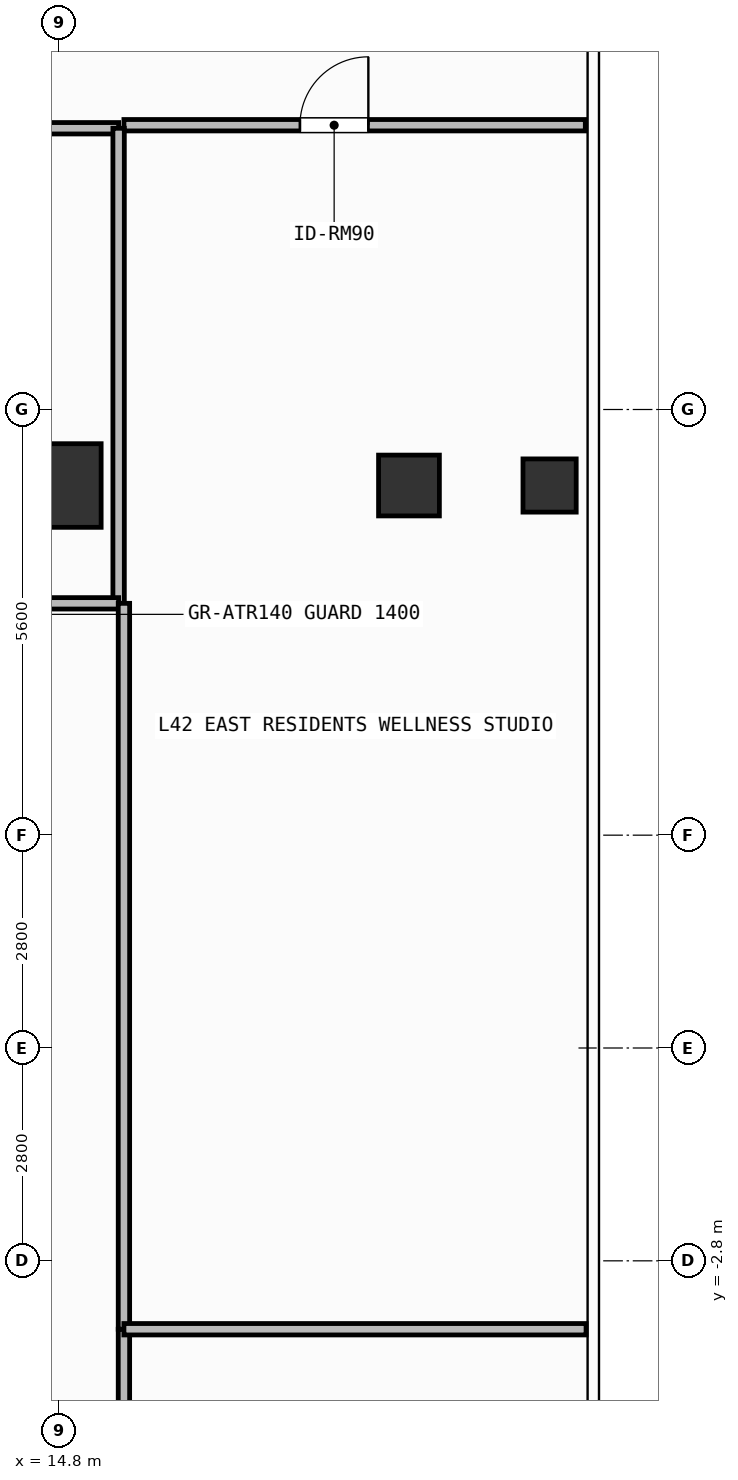
"""IFC4 building model, lengths in metres.
Left out: names, types, materials, properties, quantities, classifications, styles, units other than length and angle.
Written with IfcOpenShell. Run it as: python <this file> out.ifc"""

import sys

from ifc_helpers import new_model, si_unit, direction, frame, frame_2d, origin, origin_2d, place, context, subcontext, project, spatial, rectangle, hollow_rectangle, extrude, element, fill, save


model = new_model("IFC4")
c1 = context("Model", 3, precision=1e-05, world=origin(), true_north=direction((0.0, 1.0)))
c2 = subcontext(c1, "Body", "Model", "MODEL_VIEW")
j1 = project(units=[si_unit("LENGTHUNIT", "METRE"), si_unit("PLANEANGLEUNIT", "RADIAN")], contexts=[c1])
p1 = place(None, origin())
s1 = spatial("IfcSite", under=j1, at=p1, CompositionType="ELEMENT")
p2 = place(p1, origin())
s2 = spatial("IfcBuilding", under=s1, at=p2, CompositionType="ELEMENT")
p3 = place(p2, frame((0.0, 0.0, 171.9)))
s3 = spatial("IfcBuildingStorey", under=s2, at=p3, CompositionType="ELEMENT", Elevation=171.9)
p4 = place(p3, frame((14.8, 7.4, 0.0), z_axis=(0.0, 0.0, 1.0), x_axis=(1.0, 0.0, 0.0)))
e1 = element("IfcColumn", 1, at=p4, inside=s3, PredefinedType="COLUMN", context=c2, shape_type="SweptSolid", body=[
    extrude(rectangle(XDim=1.1, YDim=1.1, at=origin_2d()), origin(), (0.0, 0.0, 1.0), 3.9),
])
p5 = place(p3, frame((19.4, 7.4, 0.0), z_axis=(0.0, 0.0, 1.0), x_axis=(1.0, 0.0, 0.0)))
e2 = element("IfcColumn", 2, at=p5, inside=s3, PredefinedType="COLUMN", context=c2, shape_type="SweptSolid", body=[
    extrude(hollow_rectangle(XDim=0.8, YDim=0.8, WallThickness=0.036, at=origin_2d()), origin(), (0.0, 0.0, 1.0), 3.9),
])
p6 = place(p3, frame((21.25, 7.4, 0.0), z_axis=(0.0, 0.0, 1.0), x_axis=(1.0, 0.0, 0.0)))
e3 = element("IfcColumn", 3, at=p6, inside=s3, PredefinedType="COLUMN", context=c2, shape_type="SweptSolid", body=[
    extrude(hollow_rectangle(XDim=0.7, YDim=0.7, WallThickness=0.032, at=origin_2d()), origin(), (0.0, 0.0, 1.0), 3.9),
])
p7 = place(p3, frame((8.36, 12.1, 0.0), z_axis=(0.0, 0.0, 1.0), x_axis=(1.0, 0.0, 0.0)))
e4 = element("IfcWall", 4, at=p7, inside=s3, PredefinedType="PARTITIONING", context=c2, shape_type="SweptSolid", body=[
    extrude(rectangle(XDim=7.22, YDim=0.15, at=frame_2d((3.61, 0.0))), origin(), (0.0, 0.0, 1.0), 3.68),
])
p8 = place(p7, frame((3.513, 0.0, 0.0)))
e5 = element("IfcOpeningElement", 5, at=p8, cuts=e4, PredefinedType="OPENING", context=c2, shape_type="SweptSolid", body=[
    extrude(rectangle(XDim=0.9, YDim=2.1, at=frame_2d((0.45, 1.05))), frame((0.0, 0.085, 0.0), z_axis=(0.0, -1.0, 0.0), x_axis=(1.0, 0.0, 0.0)), (0.0, 0.0, 1.0), 0.17),
])
p9 = place(p3, frame((15.65, 12.14, 0.0), z_axis=(0.0, 0.0, 1.0), x_axis=(1.0, 0.0, 0.0)))
e6 = element("IfcWall", 6, at=p9, inside=s3, PredefinedType="PARTITIONING", context=c2, shape_type="SweptSolid", body=[
    extrude(rectangle(XDim=6.07, YDim=0.15, at=frame_2d((3.035, 0.0))), origin(), (0.0, 0.0, 1.0), 3.68),
])
p10 = place(p9, frame((2.316, 0.0, 0.0)))
e7 = element("IfcOpeningElement", 7, at=p10, cuts=e6, PredefinedType="OPENING", context=c2, shape_type="SweptSolid", body=[
    extrude(rectangle(XDim=0.9, YDim=2.1, at=frame_2d((0.45, 1.05))), frame((0.0, 0.085, 0.0), z_axis=(0.0, -1.0, 0.0), x_axis=(1.0, 0.0, 0.0)), (0.0, 0.0, 1.0), 0.17),
])
p11 = place(p3, frame((15.58, 5.85, 0.0), z_axis=(0.0, 0.0, 1.0), x_axis=(0.0, 1.0, 0.0)))
e8 = element("IfcWall", 8, at=p11, inside=s3, PredefinedType="PARTITIONING", context=c2, shape_type="SweptSolid", body=[
    extrude(rectangle(XDim=6.25, YDim=0.15, at=frame_2d((3.125, 0.0))), origin(), (0.0, 0.0, 1.0), 3.68),
])
p12 = place(p3, frame((8.96, 5.85, 0.0), z_axis=(0.0, 0.0, 1.0), x_axis=(1.0, 0.0, 0.0)))
e9 = element("IfcWall", 9, at=p12, inside=s3, PredefinedType="PARTITIONING", context=c2, shape_type="SweptSolid", body=[
    extrude(rectangle(XDim=6.62, YDim=0.15, at=frame_2d((3.31, 0.0))), origin(), (0.0, 0.0, 1.0), 3.68),
])
p13 = place(p3, frame((15.65, -5.85, 0.0), z_axis=(0.0, 0.0, 1.0), x_axis=(0.0, 1.0, 0.0)))
e10 = element("IfcWall", 10, at=p13, inside=s3, PredefinedType="PARTITIONING", context=c2, shape_type="SweptSolid", body=[
    extrude(rectangle(XDim=2.15, YDim=0.15, at=frame_2d((1.075, 0.0))), origin(), (0.0, 0.0, 1.0), 3.68),
])
p14 = place(p3, frame((15.65, -3.7, 0.0), z_axis=(0.0, 0.0, 1.0), x_axis=(0.0, 1.0, 0.0)))
e11 = element("IfcWall", 11, at=p14, inside=s3, PredefinedType="PARTITIONING", context=c2, shape_type="SweptSolid", body=[
    extrude(rectangle(XDim=9.55, YDim=0.15, at=frame_2d((4.775, 0.0))), origin(), (0.0, 0.0, 1.0), 3.68),
])
p15 = place(p3, frame((15.65, -3.7, 0.0), z_axis=(0.0, 0.0, 1.0), x_axis=(1.0, 0.0, 0.0)))
e12 = element("IfcWall", 12, at=p15, inside=s3, PredefinedType="PARTITIONING", context=c2, shape_type="SweptSolid", body=[
    extrude(rectangle(XDim=6.08, YDim=0.15, at=frame_2d((3.04, 0.0))), origin(), (0.0, 0.0, 1.0), 3.68),
])
p16 = place(p10, origin())
e13 = element("IfcDoor", 13, at=p16, inside=s3, OperationType="SINGLE_SWING_RIGHT", PredefinedType="DOOR", context=c2, shape_type="SweptSolid", body=[
    extrude(rectangle(XDim=0.9, YDim=2.1, at=frame_2d((0.45, 1.05))), frame((0.0, 0.025, 0.0), z_axis=(0.0, -1.0, 0.0), x_axis=(1.0, 0.0, 0.0)), (0.0, 0.0, 1.0), 0.05),
])
fill(e7, e13)
save(model, sys.argv[1])
